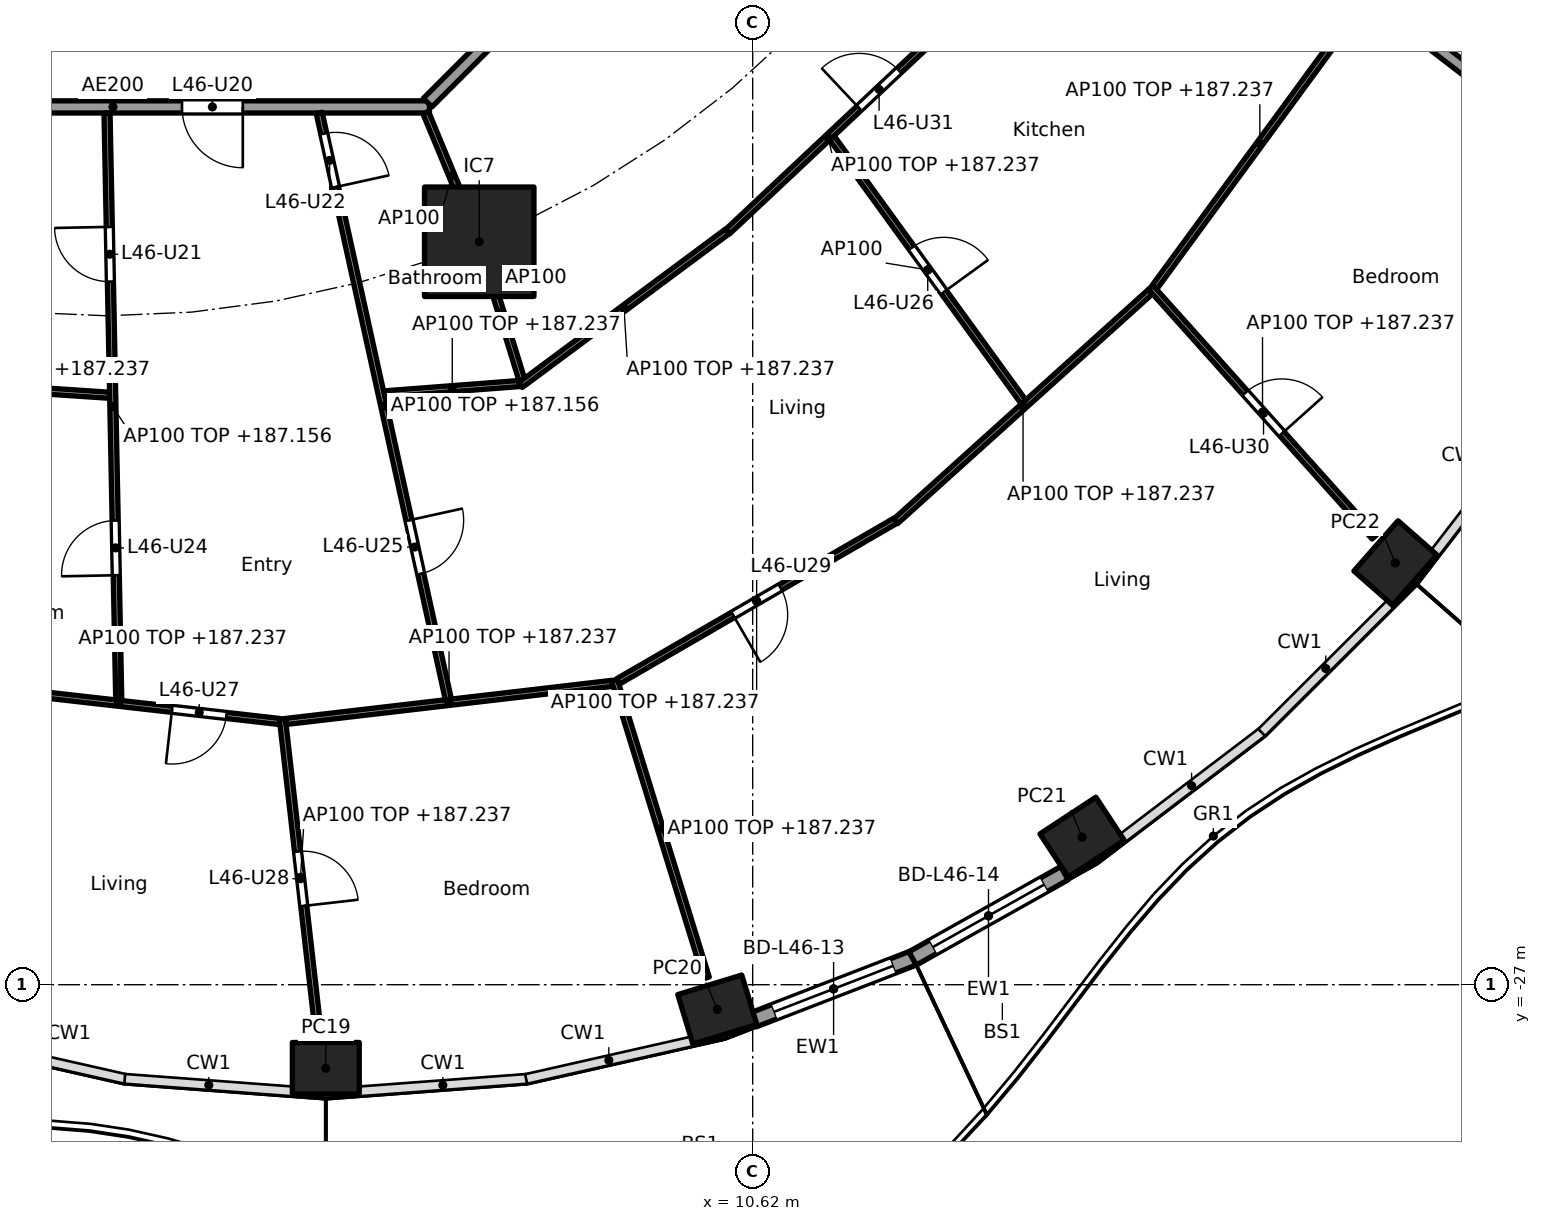
"""IFC4 building model, lengths in metres.
Left out: names, types, materials, properties, quantities, classifications, styles, units other than length and angle.
Written with IfcOpenShell. Run it as: python <this file> out.ifc"""

import sys

from ifc_helpers import new_model, si_unit, direction, frame, frame_2d, origin, origin_2d, place, context, subcontext, project, spatial, rectangle, hollow_rectangle, extrude, element, fill, save


model = new_model("IFC4")
c1 = context("Model", 3, precision=1e-05, world=origin(), true_north=direction((0.0, 1.0)))
c2 = subcontext(c1, "Body", "Model", "MODEL_VIEW")
j1 = project(units=[si_unit("LENGTHUNIT", "METRE"), si_unit("PLANEANGLEUNIT", "RADIAN")], contexts=[c1])
p1 = place(None, origin())
s1 = spatial("IfcSite", under=j1, at=p1, CompositionType="ELEMENT")
p2 = place(p1, origin())
s2 = spatial("IfcBuilding", under=s1, at=p2, CompositionType="ELEMENT")
p3 = place(p2, frame((0.0, 0.0, 184.4)))
s3 = spatial("IfcBuildingStorey", under=s2, at=p3, CompositionType="ELEMENT", Elevation=184.4)
for number, where, z_axis, x_axis in (
    (1, (3.6, -28.375, 0.0), (0.0, 0.0, 1.0), (1.0, 0.0, 0.0)),
    (2, (10.038, -27.408, 0.0), (0.0, 0.0, 1.0), (0.957, 0.292, 0.0)),
    (3, (16.038, -24.573, 0.0), (0.0, 0.0, 1.0), (0.836, 0.549, 0.0)),
    (4, (21.189, -20.064, 0.0), (0.0, 0.0, 1.0), (0.66, 0.751, 0.0)),
):
    element("IfcColumn", number, at=place(p3, frame(where, z_axis=z_axis, x_axis=x_axis)), inside=s3, PredefinedType="COLUMN", context=c2, shape_type="SweptSolid", body=[
        extrude(hollow_rectangle(XDim=1.1, YDim=0.85, WallThickness=0.036, at=origin_2d()), origin(), (0.0, 0.0, 1.0), 3.7),
    ])
p4 = place(p3, frame((6.123, -14.782, 0.0), z_axis=(0.0, 0.0, 1.0), x_axis=(1.0, 0.0, 0.0)))
e5 = element("IfcColumn", 5, at=p4, inside=s3, PredefinedType="COLUMN", context=c2, shape_type="SweptSolid", body=[
    extrude(rectangle(XDim=1.8, YDim=1.8, at=origin_2d()), origin(), (0.0, 0.0, 1.0), 3.7),
])
p5 = place(p3, frame((13.266, -26.56, 0.0), z_axis=(0.0, 0.0, 1.0), x_axis=(-0.932806734513, -0.360377019311, 0.0)))
e6 = element("IfcWall", 6, at=p5, inside=s3, PredefinedType="SOLIDWALL", context=c2, shape_type="SweptSolid", body=[
    extrude(rectangle(XDim=2.82, YDim=0.25, at=frame_2d((1.41, 0.0))), origin(), (0.0, 0.0, 1.0), 3.44),
])
p6 = place(p5, frame((0.36, 0.0, 0.0)))
e7 = element("IfcOpeningElement", 7, at=p6, cuts=e6, PredefinedType="OPENING", context=c2, shape_type="SweptSolid", body=[
    extrude(rectangle(XDim=2.1, YDim=2.4, at=frame_2d((1.05, 1.2))), frame((0.0, 0.135, 0.0), z_axis=(0.0, -1.0, 0.0), x_axis=(1.0, 0.0, 0.0)), (0.0, 0.0, 1.0), 0.27),
])
p7 = place(p3, frame((15.747, -25.167, 0.0), z_axis=(0.0, 0.0, 1.0), x_axis=(-0.872057843239, -0.489402817774, 0.0)))
e8 = element("IfcWall", 8, at=p7, inside=s3, PredefinedType="SOLIDWALL", context=c2, shape_type="SweptSolid", body=[
    extrude(rectangle(XDim=2.864, YDim=0.25, at=frame_2d((1.432, 0.0))), origin(), (0.0, 0.0, 1.0), 3.44),
])
p8 = place(p7, frame((0.382, 0.0, 0.0)))
e9 = element("IfcOpeningElement", 9, at=p8, cuts=e8, PredefinedType="OPENING", context=c2, shape_type="SweptSolid", body=[
    extrude(rectangle(XDim=2.1, YDim=2.4, at=frame_2d((1.05, 1.2))), frame((0.0, 0.135, 0.0), z_axis=(0.0, -1.0, 0.0), x_axis=(1.0, 0.0, 0.0)), (0.0, 0.0, 1.0), 0.27),
])
p9 = place(p3, frame((14.822, -6.154, 0.0), z_axis=(0.0, 0.0, 1.0), x_axis=(0.792203056092, -0.610257583254, 0.0)))
e10 = element("IfcWall", 10, at=p9, inside=s3, PredefinedType="PARTITIONING", context=c2, shape_type="SweptSolid", body=[
    extrude(rectangle(XDim=12.533, YDim=0.2, at=frame_2d((6.266, 0.0))), origin(), (0.0, 0.0, 1.0), 2.837),
])
p10 = place(p3, frame((-5.104, -12.565, 0.0), z_axis=(0.0, 0.0, 1.0), x_axis=(1.0, 0.0, 0.0)))
e11 = element("IfcWall", 11, at=p10, inside=s3, PredefinedType="PARTITIONING", context=c2, shape_type="SweptSolid", body=[
    extrude(rectangle(XDim=10.409, YDim=0.2, at=frame_2d((5.205, 0.0))), origin(), (0.0, 0.0, 1.0), 3.44),
])
p11 = place(p10, frame((6.339, 0.0, 0.0)))
e12 = element("IfcOpeningElement", 12, at=p11, cuts=e11, PredefinedType="OPENING", context=c2, shape_type="SweptSolid", body=[
    extrude(rectangle(XDim=1.0, YDim=2.1, at=frame_2d((0.5, 1.05))), frame((0.0, 0.11, 0.0), z_axis=(0.0, -1.0, 0.0), x_axis=(1.0, 0.0, 0.0)), (0.0, 0.0, 1.0), 0.22),
])
p12 = place(p3, frame((5.275, -12.494, 0.0), z_axis=(0.0, 0.0, 1.0), x_axis=(0.707106781187, 0.707106781187, 0.0)))
e13 = element("IfcWall", 13, at=p12, inside=s3, PredefinedType="PARTITIONING", context=c2, shape_type="SweptSolid", body=[
    extrude(rectangle(XDim=10.409, YDim=0.2, at=frame_2d((5.205, 0.0))), origin(), (0.0, 0.0, 1.0), 3.44),
])
p13 = place(p3, frame((-2.055, -17.166, 0.0), z_axis=(0.0, 0.0, 1.0), x_axis=(0.997756833447, -0.06694252243, 0.0)))
e14 = element("IfcWall", 14, at=p13, inside=s3, PredefinedType="PARTITIONING", context=c2, shape_type="SweptSolid", body=[
    extrude(rectangle(XDim=2.104, YDim=0.1, at=frame_2d((1.052, 0.0))), origin(), (0.0, 0.0, 1.0), 2.837),
])
p14 = place(p3, frame((-2.449, -22.073, 0.0), z_axis=(0.0, 0.0, 1.0), x_axis=(0.993660315081, -0.112424099879, 0.0)))
e15 = element("IfcWall", 15, at=p14, inside=s3, PredefinedType="PARTITIONING", context=c2, shape_type="SweptSolid", body=[
    extrude(rectangle(XDim=5.325, YDim=0.1, at=frame_2d((2.662, 0.0))), origin(), (0.0, 0.0, 1.0), 2.837),
])
p15 = place(p14, frame((3.544, 0.0, 0.0)))
e16 = element("IfcOpeningElement", 16, at=p15, cuts=e15, PredefinedType="OPENING", context=c2, shape_type="SweptSolid", body=[
    extrude(rectangle(XDim=0.9, YDim=2.1, at=frame_2d((0.45, 1.05))), frame((0.0, 0.06, 0.0), z_axis=(0.0, -1.0, 0.0), x_axis=(1.0, 0.0, 0.0)), (0.0, 0.0, 1.0), 0.12),
])
p16 = place(p3, frame((0.002, -12.665, 0.0), z_axis=(0.0, 0.0, 1.0), x_axis=(0.019992969345, -0.999800120613, 0.0)))
e17 = element("IfcWall", 17, at=p16, inside=s3, PredefinedType="PARTITIONING", context=c2, shape_type="SweptSolid", body=[
    extrude(rectangle(XDim=9.659, YDim=0.1, at=frame_2d((4.83, 0.0))), origin(), (0.0, 0.0, 1.0), 2.756),
])
p17 = place(p16, frame((1.873, 0.0, 0.0)))
e18 = element("IfcOpeningElement", 18, at=p17, cuts=e17, PredefinedType="OPENING", context=c2, shape_type="SweptSolid", body=[
    extrude(rectangle(XDim=0.9, YDim=2.1, at=frame_2d((0.45, 1.05))), frame((0.0, 0.06, 0.0), z_axis=(0.0, -1.0, 0.0), x_axis=(1.0, 0.0, 0.0)), (0.0, 0.0, 1.0), 0.12),
])
p18 = place(p16, frame((6.703, 0.0, 0.0)))
e19 = element("IfcOpeningElement", 19, at=p18, cuts=e17, PredefinedType="OPENING", context=c2, shape_type="SweptSolid", body=[
    extrude(rectangle(XDim=0.9, YDim=2.1, at=frame_2d((0.45, 1.05))), frame((0.0, 0.06, 0.0), z_axis=(0.0, -1.0, 0.0), x_axis=(1.0, 0.0, 0.0)), (0.0, 0.0, 1.0), 0.12),
])
p19 = place(p3, frame((2.885, -22.627, 0.0), z_axis=(0.0, 0.0, 1.0), x_axis=(0.113634556485, -0.993522615531, 0.0)))
e20 = element("IfcWall", 20, at=p19, inside=s3, PredefinedType="PARTITIONING", context=c2, shape_type="SweptSolid", body=[
    extrude(rectangle(XDim=5.244, YDim=0.1, at=frame_2d((2.622, 0.0))), origin(), (0.0, 0.0, 1.0), 2.837),
])
p20 = place(p19, frame((2.197, 0.0, 0.0)))
e21 = element("IfcOpeningElement", 21, at=p20, cuts=e20, PredefinedType="OPENING", context=c2, shape_type="SweptSolid", body=[
    extrude(rectangle(XDim=0.9, YDim=2.1, at=frame_2d((0.45, 1.05))), frame((0.0, 0.06, 0.0), z_axis=(0.0, -1.0, 0.0), x_axis=(1.0, 0.0, 0.0)), (0.0, 0.0, 1.0), 0.12),
])
p21 = place(p3, frame((2.941, -22.671, 0.0), z_axis=(0.0, 0.0, 1.0), x_axis=(0.993245806382, 0.1160291692, 0.0)))
e22 = element("IfcWall", 22, at=p21, inside=s3, PredefinedType="PARTITIONING", context=c2, shape_type="SweptSolid", body=[
    extrude(rectangle(XDim=5.408, YDim=0.1, at=frame_2d((2.704, 0.0))), origin(), (0.0, 0.0, 1.0), 2.837),
])
p22 = place(p3, frame((3.491, -12.662, 0.0), z_axis=(0.0, 0.0, 1.0), x_axis=(0.215082442833, -0.976595895335, 0.0)))
e23 = element("IfcWall", 23, at=p22, inside=s3, PredefinedType="PARTITIONING", context=c2, shape_type="SweptSolid", body=[
    extrude(rectangle(XDim=9.878, YDim=0.1, at=frame_2d((4.939, 0.0))), origin(), (0.0, 0.0, 1.0), 2.756),
])
p23 = place(p22, frame((0.35, 0.0, 0.0)))
e24 = element("IfcOpeningElement", 24, at=p23, cuts=e23, PredefinedType="OPENING", context=c2, shape_type="SweptSolid", body=[
    extrude(rectangle(XDim=0.9, YDim=2.1, at=frame_2d((0.45, 1.05))), frame((0.0, 0.06, 0.0), z_axis=(0.0, -1.0, 0.0), x_axis=(1.0, 0.0, 0.0)), (0.0, 0.0, 1.0), 0.12),
])
p24 = place(p22, frame((6.861, 0.0, 0.0)))
e25 = element("IfcOpeningElement", 25, at=p24, cuts=e23, PredefinedType="OPENING", context=c2, shape_type="SweptSolid", body=[
    extrude(rectangle(XDim=0.9, YDim=2.1, at=frame_2d((0.45, 1.05))), frame((0.0, 0.06, 0.0), z_axis=(0.0, -1.0, 0.0), x_axis=(1.0, 0.0, 0.0)), (0.0, 0.0, 1.0), 0.12),
])
p25 = place(p3, frame((4.568, -17.284, 0.0), z_axis=(0.0, 0.0, 1.0), x_axis=(0.997076339393, 0.076411867029, 0.0)))
e26 = element("IfcWall", 26, at=p25, inside=s3, PredefinedType="PARTITIONING", context=c2, shape_type="SweptSolid", body=[
    extrude(rectangle(XDim=2.23, YDim=0.1, at=frame_2d((1.115, 0.0))), origin(), (0.0, 0.0, 1.0), 2.837),
])
p26 = place(p3, frame((5.243, -12.657, 0.0), z_axis=(0.0, 0.0, 1.0), x_axis=(0.382719158442, -0.923864733477, 0.0)))
e27 = element("IfcWall", 27, at=p26, inside=s3, PredefinedType="PARTITIONING", context=c2, shape_type="SweptSolid", body=[
    extrude(rectangle(XDim=2.25, YDim=0.1, at=frame_2d((1.125, 0.0))), origin(), (0.0, 0.0, 1.0), 3.44),
])
p27 = place(p3, frame((6.138, -14.83, 0.0), z_axis=(0.0, 0.0, 1.0), x_axis=(0.29476151767, -0.955570849127, 0.0)))
e28 = element("IfcWall", 28, at=p27, inside=s3, PredefinedType="PARTITIONING", context=c2, shape_type="SweptSolid", body=[
    extrude(rectangle(XDim=2.336, YDim=0.1, at=frame_2d((1.168, 0.0))), origin(), (0.0, 0.0, 1.0), 3.44),
])
p28 = place(p3, frame((6.801, -17.139, 0.0), z_axis=(0.0, 0.0, 1.0), x_axis=(0.802795005531, 0.596255129198, 0.0)))
e29 = element("IfcWall", 29, at=p28, inside=s3, PredefinedType="PARTITIONING", context=c2, shape_type="SweptSolid", body=[
    extrude(rectangle(XDim=4.242, YDim=0.1, at=frame_2d((2.121, 0.0))), origin(), (0.0, 0.0, 1.0), 2.837),
])
p29 = place(p3, frame((8.347, -21.99, 0.0), z_axis=(0.0, 0.0, 1.0), x_axis=(0.294828785667, -0.955550096616, 0.0)))
e30 = element("IfcWall", 30, at=p29, inside=s3, PredefinedType="PARTITIONING", context=c2, shape_type="SweptSolid", body=[
    extrude(rectangle(XDim=5.126, YDim=0.1, at=frame_2d((2.563, 0.0))), origin(), (0.0, 0.0, 1.0), 2.837),
])
p30 = place(p3, frame((8.405, -22.013, 0.0), z_axis=(0.0, 0.0, 1.0), x_axis=(0.865277177388, 0.501293732547, 0.0)))
e31 = element("IfcWall", 31, at=p30, inside=s3, PredefinedType="PARTITIONING", context=c2, shape_type="SweptSolid", body=[
    extrude(rectangle(XDim=5.27, YDim=0.1, at=frame_2d((2.635, 0.0))), origin(), (0.0, 0.0, 1.0), 2.837),
])
p31 = place(p30, frame((2.185, 0.0, 0.0)))
e32 = element("IfcOpeningElement", 32, at=p31, cuts=e31, PredefinedType="OPENING", context=c2, shape_type="SweptSolid", body=[
    extrude(rectangle(XDim=0.9, YDim=2.1, at=frame_2d((0.45, 1.05))), frame((0.0, 0.06, 0.0), z_axis=(0.0, -1.0, 0.0), x_axis=(1.0, 0.0, 0.0)), (0.0, 0.0, 1.0), 0.12),
])
p32 = place(p3, frame((10.21, -14.614, 0.0), z_axis=(0.0, 0.0, 1.0), x_axis=(0.728883199496, 0.684638066055, 0.0)))
e33 = element("IfcWall", 33, at=p32, inside=s3, PredefinedType="PARTITIONING", context=c2, shape_type="SweptSolid", body=[
    extrude(rectangle(XDim=4.519, YDim=0.1, at=frame_2d((2.26, 0.0))), origin(), (0.0, 0.0, 1.0), 2.837),
])
p33 = place(p32, frame((2.964, 0.0, 0.0)))
e34 = element("IfcOpeningElement", 34, at=p33, cuts=e33, PredefinedType="OPENING", context=c2, shape_type="SweptSolid", body=[
    extrude(rectangle(XDim=0.9, YDim=2.1, at=frame_2d((0.45, 1.05))), frame((0.0, 0.06, 0.0), z_axis=(0.0, -1.0, 0.0), x_axis=(1.0, 0.0, 0.0)), (0.0, 0.0, 1.0), 0.12),
])
p34 = place(p3, frame((12.971, -19.38, 0.0), z_axis=(0.0, 0.0, 1.0), x_axis=(0.742768881471, 0.669547898748, 0.0)))
e35 = element("IfcWall", 35, at=p34, inside=s3, PredefinedType="PARTITIONING", context=c2, shape_type="SweptSolid", body=[
    extrude(rectangle(XDim=5.642, YDim=0.1, at=frame_2d((2.821, 0.0))), origin(), (0.0, 0.0, 1.0), 2.837),
])
p35 = place(p3, frame((11.923, -13.073, 0.0), z_axis=(0.0, 0.0, 1.0), x_axis=(0.587178522891, -0.809457461672, 0.0)))
e36 = element("IfcWall", 36, at=p35, inside=s3, PredefinedType="PARTITIONING", context=c2, shape_type="SweptSolid", body=[
    extrude(rectangle(XDim=5.366, YDim=0.1, at=frame_2d((2.683, 0.0))), origin(), (0.0, 0.0, 1.0), 3.44),
])
p36 = place(p35, frame((2.233, 0.0, 0.0)))
e37 = element("IfcOpeningElement", 37, at=p36, cuts=e36, PredefinedType="OPENING", context=c2, shape_type="SweptSolid", body=[
    extrude(rectangle(XDim=0.9, YDim=2.1, at=frame_2d((0.45, 1.05))), frame((0.0, 0.06, 0.0), z_axis=(0.0, -1.0, 0.0), x_axis=(1.0, 0.0, 0.0)), (0.0, 0.0, 1.0), 0.12),
])
p37 = place(p3, frame((17.166, -15.532, 0.0), z_axis=(0.0, 0.0, 1.0), x_axis=(0.66728415915, -0.744803229684, 0.0)))
e38 = element("IfcWall", 38, at=p37, inside=s3, PredefinedType="PARTITIONING", context=c2, shape_type="SweptSolid", body=[
    extrude(rectangle(XDim=5.511, YDim=0.1, at=frame_2d((2.756, 0.0))), origin(), (0.0, 0.0, 1.0), 2.837),
])
p38 = place(p37, frame((2.331, 0.0, 0.0)))
e39 = element("IfcOpeningElement", 39, at=p38, cuts=e38, PredefinedType="OPENING", context=c2, shape_type="SweptSolid", body=[
    extrude(rectangle(XDim=0.9, YDim=2.1, at=frame_2d((0.45, 1.05))), frame((0.0, 0.06, 0.0), z_axis=(0.0, -1.0, 0.0), x_axis=(1.0, 0.0, 0.0)), (0.0, 0.0, 1.0), 0.12),
])
p39 = place(p3, frame((17.229, -15.529, 0.0), z_axis=(0.0, 0.0, 1.0), x_axis=(0.591110768293, 0.806590391468, 0.0)))
e40 = element("IfcWall", 40, at=p39, inside=s3, PredefinedType="PARTITIONING", context=c2, shape_type="SweptSolid", body=[
    extrude(rectangle(XDim=5.86, YDim=0.1, at=frame_2d((2.93, 0.0))), origin(), (0.0, 0.0, 1.0), 2.837),
])
p40 = place(p6, origin())
e41 = element("IfcDoor", 41, at=p40, inside=s3, OperationType="SLIDING_TO_LEFT", PredefinedType="DOOR", context=c2, shape_type="SweptSolid", body=[
    extrude(rectangle(XDim=2.1, YDim=2.4, at=frame_2d((1.05, 1.2))), frame((0.0, 0.025, 0.0), z_axis=(0.0, -1.0, 0.0), x_axis=(1.0, 0.0, 0.0)), (0.0, 0.0, 1.0), 0.05),
])
fill(e7, e41)
p41 = place(p8, origin())
e42 = element("IfcDoor", 42, at=p41, inside=s3, OperationType="SLIDING_TO_LEFT", PredefinedType="DOOR", context=c2, shape_type="SweptSolid", body=[
    extrude(rectangle(XDim=2.1, YDim=2.4, at=frame_2d((1.05, 1.2))), frame((0.0, 0.025, 0.0), z_axis=(0.0, -1.0, 0.0), x_axis=(1.0, 0.0, 0.0)), (0.0, 0.0, 1.0), 0.05),
])
fill(e9, e42)
p42 = place(p11, frame((1.0, 0.0, 0.0), x_axis=(-1.0, 0.0, 0.0)))
e43 = element("IfcDoor", 43, at=p42, inside=s3, OperationType="SINGLE_SWING_LEFT", PredefinedType="DOOR", context=c2, shape_type="SweptSolid", body=[
    extrude(rectangle(XDim=1.0, YDim=2.1, at=frame_2d((0.5, 1.05))), frame((0.0, 0.025, 0.0), z_axis=(0.0, -1.0, 0.0), x_axis=(1.0, 0.0, 0.0)), (0.0, 0.0, 1.0), 0.05),
])
fill(e12, e43)
p43 = place(p17, frame((0.9, 0.0, 0.0), x_axis=(-1.0, 0.0, 0.0)))
e44 = element("IfcDoor", 44, at=p43, inside=s3, OperationType="SINGLE_SWING_RIGHT", PredefinedType="DOOR", context=c2, shape_type="SweptSolid", body=[
    extrude(rectangle(XDim=0.9, YDim=2.1, at=frame_2d((0.45, 1.05))), frame((0.0, 0.025, 0.0), z_axis=(0.0, -1.0, 0.0), x_axis=(1.0, 0.0, 0.0)), (0.0, 0.0, 1.0), 0.05),
])
fill(e18, e44)
p44 = place(p23, origin())
e45 = element("IfcDoor", 45, at=p44, inside=s3, OperationType="SINGLE_SWING_RIGHT", PredefinedType="DOOR", context=c2, shape_type="SweptSolid", body=[
    extrude(rectangle(XDim=0.9, YDim=2.1, at=frame_2d((0.45, 1.05))), frame((0.0, 0.025, 0.0), z_axis=(0.0, -1.0, 0.0), x_axis=(1.0, 0.0, 0.0)), (0.0, 0.0, 1.0), 0.05),
])
fill(e24, e45)
p45 = place(p18, frame((0.9, 0.0, 0.0), x_axis=(-1.0, 0.0, 0.0)))
e46 = element("IfcDoor", 46, at=p45, inside=s3, OperationType="SINGLE_SWING_LEFT", PredefinedType="DOOR", context=c2, shape_type="SweptSolid", body=[
    extrude(rectangle(XDim=0.9, YDim=2.1, at=frame_2d((0.45, 1.05))), frame((0.0, 0.025, 0.0), z_axis=(0.0, -1.0, 0.0), x_axis=(1.0, 0.0, 0.0)), (0.0, 0.0, 1.0), 0.05),
])
fill(e19, e46)
p46 = place(p24, origin())
e47 = element("IfcDoor", 47, at=p46, inside=s3, OperationType="SINGLE_SWING_LEFT", PredefinedType="DOOR", context=c2, shape_type="SweptSolid", body=[
    extrude(rectangle(XDim=0.9, YDim=2.1, at=frame_2d((0.45, 1.05))), frame((0.0, 0.025, 0.0), z_axis=(0.0, -1.0, 0.0), x_axis=(1.0, 0.0, 0.0)), (0.0, 0.0, 1.0), 0.05),
])
fill(e25, e47)
p47 = place(p36, origin())
e48 = element("IfcDoor", 48, at=p47, inside=s3, OperationType="SINGLE_SWING_RIGHT", PredefinedType="DOOR", context=c2, shape_type="SweptSolid", body=[
    extrude(rectangle(XDim=0.9, YDim=2.1, at=frame_2d((0.45, 1.05))), frame((0.0, 0.025, 0.0), z_axis=(0.0, -1.0, 0.0), x_axis=(1.0, 0.0, 0.0)), (0.0, 0.0, 1.0), 0.05),
])
fill(e37, e48)
p48 = place(p15, frame((0.9, 0.0, 0.0), x_axis=(-1.0, 0.0, 0.0)))
e49 = element("IfcDoor", 49, at=p48, inside=s3, OperationType="SINGLE_SWING_RIGHT", PredefinedType="DOOR", context=c2, shape_type="SweptSolid", body=[
    extrude(rectangle(XDim=0.9, YDim=2.1, at=frame_2d((0.45, 1.05))), frame((0.0, 0.025, 0.0), z_axis=(0.0, -1.0, 0.0), x_axis=(1.0, 0.0, 0.0)), (0.0, 0.0, 1.0), 0.05),
])
fill(e16, e49)
p49 = place(p20, origin())
e50 = element("IfcDoor", 50, at=p49, inside=s3, OperationType="SINGLE_SWING_RIGHT", PredefinedType="DOOR", context=c2, shape_type="SweptSolid", body=[
    extrude(rectangle(XDim=0.9, YDim=2.1, at=frame_2d((0.45, 1.05))), frame((0.0, 0.025, 0.0), z_axis=(0.0, -1.0, 0.0), x_axis=(1.0, 0.0, 0.0)), (0.0, 0.0, 1.0), 0.05),
])
fill(e21, e50)
p50 = place(p31, frame((0.9, 0.0, 0.0), x_axis=(-1.0, 0.0, 0.0)))
e51 = element("IfcDoor", 51, at=p50, inside=s3, OperationType="SINGLE_SWING_RIGHT", PredefinedType="DOOR", context=c2, shape_type="SweptSolid", body=[
    extrude(rectangle(XDim=0.9, YDim=2.1, at=frame_2d((0.45, 1.05))), frame((0.0, 0.025, 0.0), z_axis=(0.0, -1.0, 0.0), x_axis=(1.0, 0.0, 0.0)), (0.0, 0.0, 1.0), 0.05),
])
fill(e32, e51)
p51 = place(p38, origin())
e52 = element("IfcDoor", 52, at=p51, inside=s3, OperationType="SINGLE_SWING_RIGHT", PredefinedType="DOOR", context=c2, shape_type="SweptSolid", body=[
    extrude(rectangle(XDim=0.9, YDim=2.1, at=frame_2d((0.45, 1.05))), frame((0.0, 0.025, 0.0), z_axis=(0.0, -1.0, 0.0), x_axis=(1.0, 0.0, 0.0)), (0.0, 0.0, 1.0), 0.05),
])
fill(e39, e52)
p52 = place(p33, origin())
e53 = element("IfcDoor", 53, at=p52, inside=s3, OperationType="SINGLE_SWING_LEFT", PredefinedType="DOOR", context=c2, shape_type="SweptSolid", body=[
    extrude(rectangle(XDim=0.9, YDim=2.1, at=frame_2d((0.45, 1.05))), frame((0.0, 0.025, 0.0), z_axis=(0.0, -1.0, 0.0), x_axis=(1.0, 0.0, 0.0)), (0.0, 0.0, 1.0), 0.05),
])
fill(e34, e53)
save(model, sys.argv[1])
